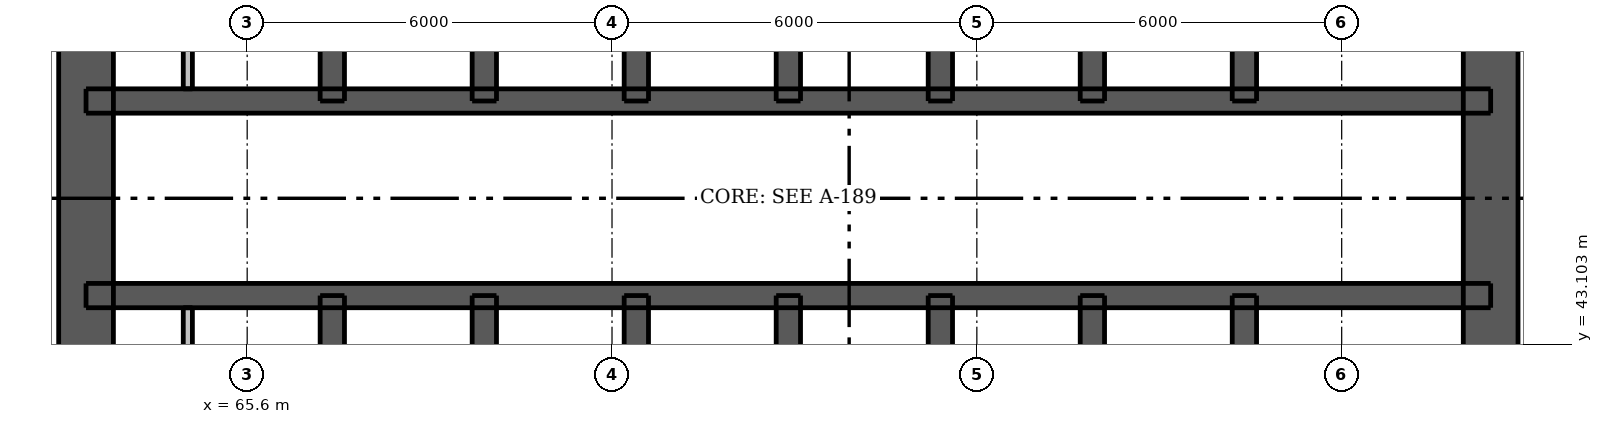
"""IFC4 building model, lengths in metres.
Left out: names, types, materials, properties, quantities, classifications, styles, units other than length and angle.
Written with IfcOpenShell. Run it as: python <this file> out.ifc"""

import sys

from ifc_helpers import new_model, si_unit, direction, frame, frame_2d, origin, place, context, subcontext, project, spatial, rectangle, extrude, element, fill, save


model = new_model("IFC4")
c1 = context("Model", 3, precision=1e-05, world=origin(), true_north=direction((0.0, 1.0)))
c2 = subcontext(c1, "Body", "Model", "MODEL_VIEW")
j1 = project(units=[si_unit("LENGTHUNIT", "METRE"), si_unit("PLANEANGLEUNIT", "RADIAN")], contexts=[c1])
p1 = place(None, origin())
s1 = spatial("IfcSite", under=j1, at=p1, CompositionType="ELEMENT")
p2 = place(p1, origin())
s2 = spatial("IfcBuilding", under=s1, at=p2, CompositionType="ELEMENT")
p3 = place(p2, frame((0.0, 0.0, 59.8)))
s3 = spatial("IfcBuildingStorey", under=s2, at=p3, CompositionType="ELEMENT", Elevation=59.8)
p4 = place(p3, frame((62.95, 33.5, 0.0), z_axis=(0.0, 0.0, 1.0), x_axis=(0.0, 1.0, 0.0)))
e1 = element("IfcWall", 1, at=p4, inside=s3, PredefinedType="SHEAR", context=c2, shape_type="SweptSolid", body=[
    extrude(rectangle(XDim=24.0, YDim=0.9, at=frame_2d((12.0, 0.0))), origin(), (0.0, 0.0, 1.0), 3.05),
])
p5 = place(p4, frame((11.2, 0.0, 0.0)))
e2 = element("IfcOpeningElement", 2, at=p5, cuts=e1, PredefinedType="OPENING", context=c2, shape_type="SweptSolid", body=[
    extrude(rectangle(XDim=1.6, YDim=2.1, at=frame_2d((0.8, 1.05))), frame((0.0, 0.46, 0.0), z_axis=(0.0, -1.0, 0.0), x_axis=(1.0, 0.0, 0.0)), (0.0, 0.0, 1.0), 0.92),
])
p6 = place(p3, frame((86.05, 33.5, 0.0), z_axis=(0.0, 0.0, 1.0), x_axis=(0.0, 1.0, 0.0)))
e3 = element("IfcWall", 3, at=p6, inside=s3, PredefinedType="SHEAR", context=c2, shape_type="SweptSolid", body=[
    extrude(rectangle(XDim=24.0, YDim=0.9, at=frame_2d((12.0, 0.0))), origin(), (0.0, 0.0, 1.0), 3.05),
])
p7 = place(p6, frame((11.2, 0.0, 0.0)))
e4 = element("IfcOpeningElement", 4, at=p7, cuts=e3, PredefinedType="OPENING", context=c2, shape_type="SweptSolid", body=[
    extrude(rectangle(XDim=1.6, YDim=2.1, at=frame_2d((0.8, 1.05))), frame((0.0, 0.46, 0.0), z_axis=(0.0, -1.0, 0.0), x_axis=(1.0, 0.0, 0.0)), (0.0, 0.0, 1.0), 0.92),
])
p8 = place(p3, frame((62.95, 43.9, 0.0), z_axis=(0.0, 0.0, 1.0), x_axis=(1.0, 0.0, 0.0)))
e5 = element("IfcWall", 5, at=p8, inside=s3, PredefinedType="SHEAR", context=c2, shape_type="SweptSolid", body=[
    extrude(rectangle(XDim=23.1, YDim=0.4, at=frame_2d((11.55, 0.0))), origin(), (0.0, 0.0, 1.0), 3.05),
])
p9 = place(p8, frame((0.662, 0.0, 0.0)))
e6 = element("IfcOpeningElement", 6, at=p9, cuts=e5, PredefinedType="OPENING", context=c2, shape_type="SweptSolid", body=[
    extrude(rectangle(XDim=0.8, YDim=2.1, at=frame_2d((0.4, 1.05))), frame((0.0, 0.21, 0.0), z_axis=(0.0, -1.0, 0.0), x_axis=(1.0, 0.0, 0.0)), (0.0, 0.0, 1.0), 0.42),
])
p10 = place(p8, frame((2.312, 0.0, 0.0)))
e7 = element("IfcOpeningElement", 7, at=p10, cuts=e5, PredefinedType="OPENING", context=c2, shape_type="SweptSolid", body=[
    extrude(rectangle(XDim=0.9, YDim=2.1, at=frame_2d((0.45, 1.05))), frame((0.0, 0.21, 0.0), z_axis=(0.0, -1.0, 0.0), x_axis=(1.0, 0.0, 0.0)), (0.0, 0.0, 1.0), 0.42),
])
p11 = place(p8, frame((20.5, 0.0, 0.0)))
e8 = element("IfcOpeningElement", 8, at=p11, cuts=e5, PredefinedType="OPENING", context=c2, shape_type="SweptSolid", body=[
    extrude(rectangle(XDim=0.9, YDim=2.1, at=frame_2d((0.45, 1.05))), frame((0.0, 0.21, 0.0), z_axis=(0.0, -1.0, 0.0), x_axis=(1.0, 0.0, 0.0)), (0.0, 0.0, 1.0), 0.42),
])
p12 = place(p8, frame((4.75, 0.0, 0.0)))
e9 = element("IfcOpeningElement", 9, at=p12, cuts=e5, PredefinedType="OPENING", context=c2, shape_type="SweptSolid", body=[
    extrude(rectangle(XDim=1.1, YDim=2.1, at=frame_2d((0.55, 1.05))), frame((0.0, 0.21, 0.0), z_axis=(0.0, -1.0, 0.0), x_axis=(1.0, 0.0, 0.0)), (0.0, 0.0, 1.0), 0.42),
])
p13 = place(p8, frame((7.25, 0.0, 0.0)))
e10 = element("IfcOpeningElement", 10, at=p13, cuts=e5, PredefinedType="OPENING", context=c2, shape_type="SweptSolid", body=[
    extrude(rectangle(XDim=1.1, YDim=2.1, at=frame_2d((0.55, 1.05))), frame((0.0, 0.21, 0.0), z_axis=(0.0, -1.0, 0.0), x_axis=(1.0, 0.0, 0.0)), (0.0, 0.0, 1.0), 0.42),
])
p14 = place(p8, frame((9.75, 0.0, 0.0)))
e11 = element("IfcOpeningElement", 11, at=p14, cuts=e5, PredefinedType="OPENING", context=c2, shape_type="SweptSolid", body=[
    extrude(rectangle(XDim=1.1, YDim=2.1, at=frame_2d((0.55, 1.05))), frame((0.0, 0.21, 0.0), z_axis=(0.0, -1.0, 0.0), x_axis=(1.0, 0.0, 0.0)), (0.0, 0.0, 1.0), 0.42),
])
p15 = place(p8, frame((12.25, 0.0, 0.0)))
e12 = element("IfcOpeningElement", 12, at=p15, cuts=e5, PredefinedType="OPENING", context=c2, shape_type="SweptSolid", body=[
    extrude(rectangle(XDim=1.1, YDim=2.1, at=frame_2d((0.55, 1.05))), frame((0.0, 0.21, 0.0), z_axis=(0.0, -1.0, 0.0), x_axis=(1.0, 0.0, 0.0)), (0.0, 0.0, 1.0), 0.42),
])
p16 = place(p8, frame((14.75, 0.0, 0.0)))
e13 = element("IfcOpeningElement", 13, at=p16, cuts=e5, PredefinedType="OPENING", context=c2, shape_type="SweptSolid", body=[
    extrude(rectangle(XDim=1.1, YDim=2.1, at=frame_2d((0.55, 1.05))), frame((0.0, 0.21, 0.0), z_axis=(0.0, -1.0, 0.0), x_axis=(1.0, 0.0, 0.0)), (0.0, 0.0, 1.0), 0.42),
])
p17 = place(p8, frame((17.25, 0.0, 0.0)))
e14 = element("IfcOpeningElement", 14, at=p17, cuts=e5, PredefinedType="OPENING", context=c2, shape_type="SweptSolid", body=[
    extrude(rectangle(XDim=1.1, YDim=2.1, at=frame_2d((0.55, 1.05))), frame((0.0, 0.21, 0.0), z_axis=(0.0, -1.0, 0.0), x_axis=(1.0, 0.0, 0.0)), (0.0, 0.0, 1.0), 0.42),
])
p18 = place(p3, frame((62.95, 47.1, 0.0), z_axis=(0.0, 0.0, 1.0), x_axis=(1.0, 0.0, 0.0)))
e15 = element("IfcWall", 15, at=p18, inside=s3, PredefinedType="SHEAR", context=c2, shape_type="SweptSolid", body=[
    extrude(rectangle(XDim=23.1, YDim=0.4, at=frame_2d((11.55, 0.0))), origin(), (0.0, 0.0, 1.0), 3.05),
])
p19 = place(p18, frame((0.662, 0.0, 0.0)))
e16 = element("IfcOpeningElement", 16, at=p19, cuts=e15, PredefinedType="OPENING", context=c2, shape_type="SweptSolid", body=[
    extrude(rectangle(XDim=0.8, YDim=2.1, at=frame_2d((0.4, 1.05))), frame((0.0, 0.21, 0.0), z_axis=(0.0, -1.0, 0.0), x_axis=(1.0, 0.0, 0.0)), (0.0, 0.0, 1.0), 0.42),
])
p20 = place(p18, frame((2.312, 0.0, 0.0)))
e17 = element("IfcOpeningElement", 17, at=p20, cuts=e15, PredefinedType="OPENING", context=c2, shape_type="SweptSolid", body=[
    extrude(rectangle(XDim=0.9, YDim=2.1, at=frame_2d((0.45, 1.05))), frame((0.0, 0.21, 0.0), z_axis=(0.0, -1.0, 0.0), x_axis=(1.0, 0.0, 0.0)), (0.0, 0.0, 1.0), 0.42),
])
p21 = place(p18, frame((20.5, 0.0, 0.0)))
e18 = element("IfcOpeningElement", 18, at=p21, cuts=e15, PredefinedType="OPENING", context=c2, shape_type="SweptSolid", body=[
    extrude(rectangle(XDim=0.9, YDim=2.1, at=frame_2d((0.45, 1.05))), frame((0.0, 0.21, 0.0), z_axis=(0.0, -1.0, 0.0), x_axis=(1.0, 0.0, 0.0)), (0.0, 0.0, 1.0), 0.42),
])
p22 = place(p3, frame((67.0, 33.95, 0.0), z_axis=(0.0, 0.0, 1.0), x_axis=(0.0, 1.0, 0.0)))
e19 = element("IfcWall", 19, at=p22, inside=s3, PredefinedType="SHEAR", context=c2, shape_type="SweptSolid", body=[
    extrude(rectangle(XDim=9.95, YDim=0.4, at=frame_2d((4.975, 0.0))), origin(), (0.0, 0.0, 1.0), 3.05),
])
p23 = place(p22, frame((0.65, 0.0, 0.0)))
e20 = element("IfcOpeningElement", 20, at=p23, cuts=e19, PredefinedType="OPENING", context=c2, shape_type="SweptSolid", body=[
    extrude(rectangle(XDim=1.1, YDim=2.1, at=frame_2d((0.55, 1.05))), frame((0.0, 0.21, 0.0), z_axis=(0.0, -1.0, 0.0), x_axis=(1.0, 0.0, 0.0)), (0.0, 0.0, 1.0), 0.42),
])
for number, where, z_axis, x_axis in (
    (21, (67.0, 47.1, 0.0), (0.0, 0.0, 1.0), (0.0, 1.0, 0.0)),
    (22, (82.0, 33.95, 0.0), (0.0, 0.0, 1.0), (0.0, 1.0, 0.0)),
    (23, (82.0, 47.1, 0.0), (0.0, 0.0, 1.0), (0.0, 1.0, 0.0)),
):
    element("IfcWall", number, at=place(p3, frame(where, z_axis=z_axis, x_axis=x_axis)), inside=s3, PredefinedType="SHEAR", context=c2, shape_type="SweptSolid", body=[
        extrude(rectangle(XDim=9.95, YDim=0.4, at=frame_2d((4.975, 0.0))), origin(), (0.0, 0.0, 1.0), 3.05),
    ])
for number, where, z_axis, x_axis in (
    (24, (69.5, 41.0, 0.0), (0.0, 0.0, 1.0), (0.0, 1.0, 0.0)),
    (25, (69.5, 47.1, 0.0), (0.0, 0.0, 1.0), (0.0, 1.0, 0.0)),
    (26, (72.0, 41.0, 0.0), (0.0, 0.0, 1.0), (0.0, 1.0, 0.0)),
    (27, (72.0, 47.1, 0.0), (0.0, 0.0, 1.0), (0.0, 1.0, 0.0)),
    (28, (74.5, 41.0, 0.0), (0.0, 0.0, 1.0), (0.0, 1.0, 0.0)),
    (29, (74.5, 47.1, 0.0), (0.0, 0.0, 1.0), (0.0, 1.0, 0.0)),
    (30, (77.0, 41.0, 0.0), (0.0, 0.0, 1.0), (0.0, 1.0, 0.0)),
    (31, (77.0, 47.1, 0.0), (0.0, 0.0, 1.0), (0.0, 1.0, 0.0)),
    (32, (79.5, 41.0, 0.0), (0.0, 0.0, 1.0), (0.0, 1.0, 0.0)),
    (33, (79.5, 47.1, 0.0), (0.0, 0.0, 1.0), (0.0, 1.0, 0.0)),
):
    element("IfcWall", number, at=place(p3, frame(where, z_axis=z_axis, x_axis=x_axis)), inside=s3, PredefinedType="SHEAR", context=c2, shape_type="SweptSolid", body=[
        extrude(rectangle(XDim=2.9, YDim=0.4, at=frame_2d((1.45, 0.0))), origin(), (0.0, 0.0, 1.0), 3.05),
    ])
for number, where, z_axis, x_axis in (
    (34, (64.624, 41.2, 0.0), (0.0, 0.0, 1.0), (0.0, 1.0, 0.0)),
    (35, (64.624, 47.3, 0.0), (0.0, 0.0, 1.0), (0.0, 1.0, 0.0)),
):
    element("IfcWall", number, at=place(p3, frame(where, z_axis=z_axis, x_axis=x_axis)), inside=s3, PredefinedType="PLUMBINGWALL", context=c2, shape_type="SweptSolid", body=[
        extrude(rectangle(XDim=2.5, YDim=0.15, at=frame_2d((1.25, 0.0))), origin(), (0.0, 0.0, 1.0), 3.05),
    ])
p24 = place(p5, origin())
e36 = element("IfcDoor", 36, at=p24, inside=s3, OperationType="DOUBLE_DOOR_SINGLE_SWING", PredefinedType="DOOR", context=c2, shape_type="SweptSolid", body=[
    extrude(rectangle(XDim=1.6, YDim=2.1, at=frame_2d((0.8, 1.05))), frame((0.0, -0.388, 0.0), z_axis=(0.0, -1.0, 0.0), x_axis=(1.0, 0.0, 0.0)), (0.0, 0.0, 1.0), 0.05),
])
fill(e2, e36)
p25 = place(p7, origin())
e37 = element("IfcDoor", 37, at=p25, inside=s3, OperationType="DOUBLE_DOOR_SINGLE_SWING", PredefinedType="DOOR", context=c2, shape_type="SweptSolid", body=[
    extrude(rectangle(XDim=1.6, YDim=2.1, at=frame_2d((0.8, 1.05))), frame((0.0, 0.438, 0.0), z_axis=(0.0, -1.0, 0.0), x_axis=(1.0, 0.0, 0.0)), (0.0, 0.0, 1.0), 0.05),
])
fill(e4, e37)
p26 = place(p9, origin())
e38 = element("IfcDoor", 38, at=p26, inside=s3, OperationType="SINGLE_SWING_LEFT", PredefinedType="DOOR", context=c2, shape_type="SweptSolid", body=[
    extrude(rectangle(XDim=0.8, YDim=2.1, at=frame_2d((0.4, 1.05))), frame((0.0, -0.138, 0.0), z_axis=(0.0, -1.0, 0.0), x_axis=(1.0, 0.0, 0.0)), (0.0, 0.0, 1.0), 0.05),
])
fill(e6, e38)
p27 = place(p10, origin())
e39 = element("IfcDoor", 39, at=p27, inside=s3, OperationType="SINGLE_SWING_RIGHT", PredefinedType="DOOR", context=c2, shape_type="SweptSolid", body=[
    extrude(rectangle(XDim=0.9, YDim=2.1, at=frame_2d((0.45, 1.05))), frame((0.0, -0.138, 0.0), z_axis=(0.0, -1.0, 0.0), x_axis=(1.0, 0.0, 0.0)), (0.0, 0.0, 1.0), 0.05),
])
fill(e7, e39)
p28 = place(p11, origin())
e40 = element("IfcDoor", 40, at=p28, inside=s3, OperationType="SINGLE_SWING_LEFT", PredefinedType="DOOR", context=c2, shape_type="SweptSolid", body=[
    extrude(rectangle(XDim=0.9, YDim=2.1, at=frame_2d((0.45, 1.05))), frame((0.0, -0.138, 0.0), z_axis=(0.0, -1.0, 0.0), x_axis=(1.0, 0.0, 0.0)), (0.0, 0.0, 1.0), 0.05),
])
fill(e8, e40)
p29 = place(p19, origin())
e41 = element("IfcDoor", 41, at=p29, inside=s3, OperationType="SINGLE_SWING_LEFT", PredefinedType="DOOR", context=c2, shape_type="SweptSolid", body=[
    extrude(rectangle(XDim=0.8, YDim=2.1, at=frame_2d((0.4, 1.05))), frame((0.0, 0.188, 0.0), z_axis=(0.0, -1.0, 0.0), x_axis=(1.0, 0.0, 0.0)), (0.0, 0.0, 1.0), 0.05),
])
fill(e16, e41)
p30 = place(p20, origin())
e42 = element("IfcDoor", 42, at=p30, inside=s3, OperationType="SINGLE_SWING_RIGHT", PredefinedType="DOOR", context=c2, shape_type="SweptSolid", body=[
    extrude(rectangle(XDim=0.9, YDim=2.1, at=frame_2d((0.45, 1.05))), frame((0.0, 0.188, 0.0), z_axis=(0.0, -1.0, 0.0), x_axis=(1.0, 0.0, 0.0)), (0.0, 0.0, 1.0), 0.05),
])
fill(e17, e42)
p31 = place(p21, origin())
e43 = element("IfcDoor", 43, at=p31, inside=s3, OperationType="SINGLE_SWING_LEFT", PredefinedType="DOOR", context=c2, shape_type="SweptSolid", body=[
    extrude(rectangle(XDim=0.9, YDim=2.1, at=frame_2d((0.45, 1.05))), frame((0.0, 0.188, 0.0), z_axis=(0.0, -1.0, 0.0), x_axis=(1.0, 0.0, 0.0)), (0.0, 0.0, 1.0), 0.05),
])
fill(e18, e43)
p32 = place(p12, origin())
e44 = element("IfcDoor", 44, at=p32, inside=s3, OperationType="DOUBLE_DOOR_SLIDING", PredefinedType="DOOR", context=c2, shape_type="SweptSolid", body=[
    extrude(rectangle(XDim=1.1, YDim=2.1, at=frame_2d((0.55, 1.05))), frame((0.0, 0.025, 0.0), z_axis=(0.0, -1.0, 0.0), x_axis=(1.0, 0.0, 0.0)), (0.0, 0.0, 1.0), 0.05),
])
fill(e9, e44)
p33 = place(p13, origin())
e45 = element("IfcDoor", 45, at=p33, inside=s3, OperationType="DOUBLE_DOOR_SLIDING", PredefinedType="DOOR", context=c2, shape_type="SweptSolid", body=[
    extrude(rectangle(XDim=1.1, YDim=2.1, at=frame_2d((0.55, 1.05))), frame((0.0, 0.025, 0.0), z_axis=(0.0, -1.0, 0.0), x_axis=(1.0, 0.0, 0.0)), (0.0, 0.0, 1.0), 0.05),
])
fill(e10, e45)
p34 = place(p14, origin())
e46 = element("IfcDoor", 46, at=p34, inside=s3, OperationType="DOUBLE_DOOR_SLIDING", PredefinedType="DOOR", context=c2, shape_type="SweptSolid", body=[
    extrude(rectangle(XDim=1.1, YDim=2.1, at=frame_2d((0.55, 1.05))), frame((0.0, 0.025, 0.0), z_axis=(0.0, -1.0, 0.0), x_axis=(1.0, 0.0, 0.0)), (0.0, 0.0, 1.0), 0.05),
])
fill(e11, e46)
p35 = place(p15, origin())
e47 = element("IfcDoor", 47, at=p35, inside=s3, OperationType="DOUBLE_DOOR_SLIDING", PredefinedType="DOOR", context=c2, shape_type="SweptSolid", body=[
    extrude(rectangle(XDim=1.1, YDim=2.1, at=frame_2d((0.55, 1.05))), frame((0.0, 0.025, 0.0), z_axis=(0.0, -1.0, 0.0), x_axis=(1.0, 0.0, 0.0)), (0.0, 0.0, 1.0), 0.05),
])
fill(e12, e47)
p36 = place(p16, origin())
e48 = element("IfcDoor", 48, at=p36, inside=s3, OperationType="DOUBLE_DOOR_SLIDING", PredefinedType="DOOR", context=c2, shape_type="SweptSolid", body=[
    extrude(rectangle(XDim=1.1, YDim=2.1, at=frame_2d((0.55, 1.05))), frame((0.0, 0.025, 0.0), z_axis=(0.0, -1.0, 0.0), x_axis=(1.0, 0.0, 0.0)), (0.0, 0.0, 1.0), 0.05),
])
fill(e13, e48)
p37 = place(p17, origin())
e49 = element("IfcDoor", 49, at=p37, inside=s3, OperationType="DOUBLE_DOOR_SLIDING", PredefinedType="DOOR", context=c2, shape_type="SweptSolid", body=[
    extrude(rectangle(XDim=1.1, YDim=2.1, at=frame_2d((0.55, 1.05))), frame((0.0, 0.025, 0.0), z_axis=(0.0, -1.0, 0.0), x_axis=(1.0, 0.0, 0.0)), (0.0, 0.0, 1.0), 0.05),
])
fill(e14, e49)
save(model, sys.argv[1])
